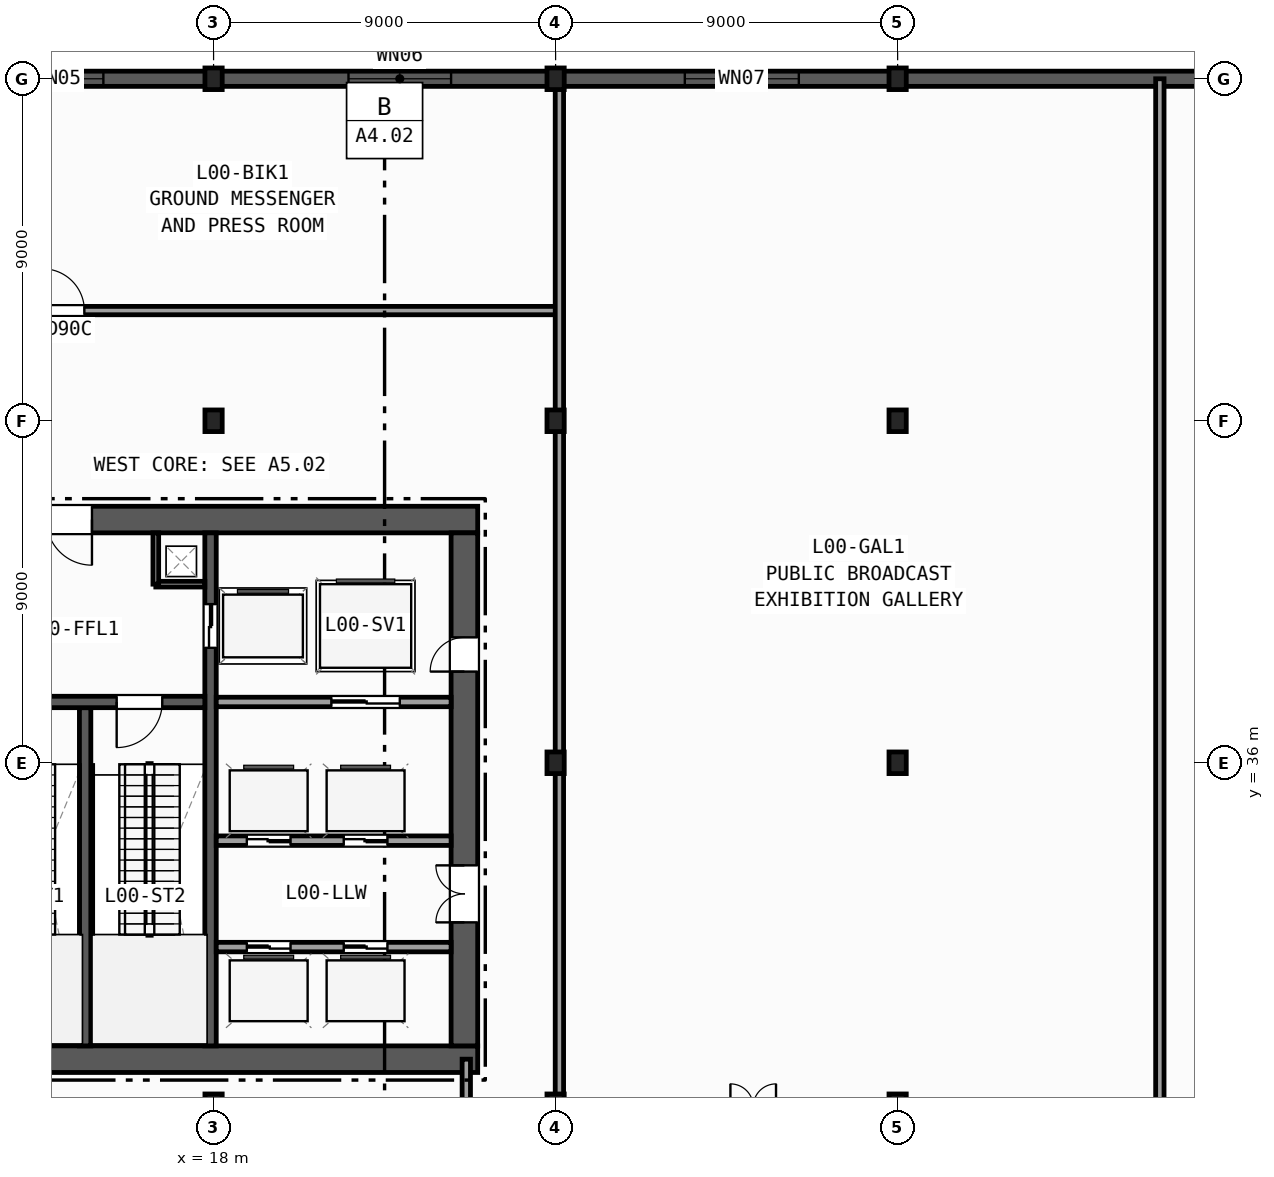
"""IFC4 building model, lengths in metres.
Left out: names, types, materials, properties, quantities, classifications, styles, units other than length and angle.
Written with IfcOpenShell. Run it as: python <this file> out.ifc"""

import sys

from ifc_helpers import new_model, si_unit, direction, frame, frame_2d, origin, origin_2d, place, context, subcontext, project, spatial, rectangle, i_section, extrude, element, fill, save


model = new_model("IFC4")
c1 = context("Model", 3, precision=1e-05, world=origin(), true_north=direction((0.0, 1.0)))
c2 = subcontext(c1, "Body", "Model", "MODEL_VIEW")
j1 = project(units=[si_unit("LENGTHUNIT", "METRE"), si_unit("PLANEANGLEUNIT", "RADIAN")], contexts=[c1])
p1 = place(None, origin())
s1 = spatial("IfcSite", under=j1, at=p1, CompositionType="ELEMENT")
p2 = place(p1, origin())
s2 = spatial("IfcBuilding", under=s1, at=p2, CompositionType="ELEMENT")
p3 = place(p2, origin())
s3 = spatial("IfcBuildingStorey", under=s2, at=p3, CompositionType="ELEMENT", Elevation=0.0)
for number, where, z_axis, x_axis in (
    (1, (18.0, 27.0, 0.0), (0.0, 0.0, 1.0), (1.0, 0.0, 0.0)),
    (2, (18.0, 45.0, 0.0), (0.0, 0.0, 1.0), (1.0, 0.0, 0.0)),
    (3, (18.0, 54.0, 0.0), (0.0, 0.0, 1.0), (1.0, 0.0, 0.0)),
    (4, (27.0, 27.0, 0.0), (0.0, 0.0, 1.0), (1.0, 0.0, 0.0)),
    (5, (27.0, 36.0, 0.0), (0.0, 0.0, 1.0), (1.0, 0.0, 0.0)),
    (6, (27.0, 45.0, 0.0), (0.0, 0.0, 1.0), (1.0, 0.0, 0.0)),
    (7, (27.0, 54.0, 0.0), (0.0, 0.0, 1.0), (1.0, 0.0, 0.0)),
    (8, (36.0, 27.0, 0.0), (0.0, 0.0, 1.0), (1.0, 0.0, 0.0)),
    (9, (36.0, 36.0, 0.0), (0.0, 0.0, 1.0), (1.0, 0.0, 0.0)),
    (10, (36.0, 45.0, 0.0), (0.0, 0.0, 1.0), (1.0, 0.0, 0.0)),
    (11, (36.0, 54.0, 0.0), (0.0, 0.0, 1.0), (1.0, 0.0, 0.0)),
):
    element("IfcColumn", number, at=place(p3, frame(where, z_axis=z_axis, x_axis=x_axis)), inside=s3, PredefinedType="COLUMN", context=c2, shape_type="SweptSolid", body=[
        extrude(i_section(OverallWidth=0.454, OverallDepth=0.569, WebThickness=0.078, FlangeThickness=0.125, FilletRadius=0.015, at=origin_2d()), origin(), (0.0, 0.0, 1.0), 5.8),
    ])
p4 = place(p3, frame((0.2, 54.0, 0.0), z_axis=(0.0, 0.0, 1.0), x_axis=(1.0, 0.0, 0.0)))
e12 = element("IfcWall", 12, at=p4, inside=s3, PredefinedType="SOLIDWALL", context=c2, shape_type="SweptSolid", body=[
    extrude(rectangle(XDim=62.6, YDim=0.4, at=frame_2d((31.3, 0.0))), origin(), (0.0, 0.0, 1.0), 5.48),
])
p5 = place(p4, frame((4.1, 0.0, 1.1)))
e13 = element("IfcOpeningElement", 13, at=p5, cuts=e12, PredefinedType="OPENING", context=c2, shape_type="SweptSolid", body=[
    extrude(rectangle(XDim=1.2, YDim=1.5, at=frame_2d((0.6, 0.75))), frame((0.0, 0.21, 0.0), z_axis=(0.0, -1.0, 0.0), x_axis=(1.0, 0.0, 0.0)), (0.0, 0.0, 1.0), 0.42),
])
p6 = place(p4, frame((12.5, 0.0, 1.1)))
e14 = element("IfcOpeningElement", 14, at=p6, cuts=e12, PredefinedType="OPENING", context=c2, shape_type="SweptSolid", body=[
    extrude(rectangle(XDim=2.4, YDim=1.95, at=frame_2d((1.2, 0.975))), frame((0.0, 0.21, 0.0), z_axis=(0.0, -1.0, 0.0), x_axis=(1.0, 0.0, 0.0)), (0.0, 0.0, 1.0), 0.42),
])
p7 = place(p4, frame((21.35, 0.0, 1.1)))
e15 = element("IfcOpeningElement", 15, at=p7, cuts=e12, PredefinedType="OPENING", context=c2, shape_type="SweptSolid", body=[
    extrude(rectangle(XDim=2.7, YDim=2.1, at=frame_2d((1.35, 1.05))), frame((0.0, 0.21, 0.0), z_axis=(0.0, -1.0, 0.0), x_axis=(1.0, 0.0, 0.0)), (0.0, 0.0, 1.0), 0.42),
])
p8 = place(p4, frame((30.2, 0.0, 1.1)))
e16 = element("IfcOpeningElement", 16, at=p8, cuts=e12, PredefinedType="OPENING", context=c2, shape_type="SweptSolid", body=[
    extrude(rectangle(XDim=3.0, YDim=2.25, at=frame_2d((1.5, 1.125))), frame((0.0, 0.21, 0.0), z_axis=(0.0, -1.0, 0.0), x_axis=(1.0, 0.0, 0.0)), (0.0, 0.0, 1.0), 0.42),
])
p9 = place(p4, frame((48.575, 0.0, 1.1)))
e17 = element("IfcOpeningElement", 17, at=p9, cuts=e12, PredefinedType="OPENING", context=c2, shape_type="SweptSolid", body=[
    extrude(rectangle(XDim=2.25, YDim=2.1, at=frame_2d((1.125, 1.05))), frame((0.0, 0.21, 0.0), z_axis=(0.0, -1.0, 0.0), x_axis=(1.0, 0.0, 0.0)), (0.0, 0.0, 1.0), 0.42),
])
p10 = place(p4, frame((57.425, 0.0, 1.1)))
e18 = element("IfcOpeningElement", 18, at=p10, cuts=e12, PredefinedType="OPENING", context=c2, shape_type="SweptSolid", body=[
    extrude(rectangle(XDim=2.55, YDim=2.25, at=frame_2d((1.275, 1.125))), frame((0.0, 0.21, 0.0), z_axis=(0.0, -1.0, 0.0), x_axis=(1.0, 0.0, 0.0)), (0.0, 0.0, 1.0), 0.42),
])
p11 = place(p3, frame((24.95, 28.2, 0.0), z_axis=(0.0, 0.0, 1.0), x_axis=(-1.0, 0.0, 0.0)))
e19 = element("IfcWall", 19, at=p11, inside=s3, PredefinedType="SHEAR", context=c2, shape_type="SweptSolid", body=[
    extrude(rectangle(XDim=14.1, YDim=0.7, at=frame_2d((7.05, 0.0))), origin(), (0.0, 0.0, 1.0), 5.48),
])
p12 = place(p3, frame((24.95, 42.4, 0.0), z_axis=(0.0, 0.0, 1.0), x_axis=(-1.0, 0.0, 0.0)))
e20 = element("IfcWall", 20, at=p12, inside=s3, PredefinedType="SHEAR", context=c2, shape_type="SweptSolid", body=[
    extrude(rectangle(XDim=14.1, YDim=0.7, at=frame_2d((7.05, 0.0))), origin(), (0.0, 0.0, 1.0), 5.48),
])
p13 = place(p12, frame((10.15, 0.0, 0.0)))
e21 = element("IfcOpeningElement", 21, at=p13, cuts=e20, PredefinedType="OPENING", context=c2, shape_type="SweptSolid", body=[
    extrude(rectangle(XDim=1.2, YDim=2.15, at=frame_2d((0.6, 1.075))), frame((0.0, 0.36, 0.0), z_axis=(0.0, -1.0, 0.0), x_axis=(1.0, 0.0, 0.0)), (0.0, 0.0, 1.0), 0.72),
])
p14 = place(p3, frame((24.6, 28.55, 0.0), z_axis=(0.0, 0.0, 1.0), x_axis=(0.0, 1.0, 0.0)))
e22 = element("IfcWall", 22, at=p14, inside=s3, PredefinedType="SHEAR", context=c2, shape_type="SweptSolid", body=[
    extrude(rectangle(XDim=13.5, YDim=0.7, at=frame_2d((6.75, 0.0))), origin(), (0.0, 0.0, 1.0), 5.48),
])
p15 = place(p14, frame((3.25, 0.0, 0.0)))
e23 = element("IfcOpeningElement", 23, at=p15, cuts=e22, PredefinedType="OPENING", context=c2, shape_type="SweptSolid", body=[
    extrude(rectangle(XDim=1.5, YDim=2.2, at=frame_2d((0.75, 1.1))), frame((0.0, 0.36, 0.0), z_axis=(0.0, -1.0, 0.0), x_axis=(1.0, 0.0, 0.0)), (0.0, 0.0, 1.0), 0.72),
])
p16 = place(p14, frame((9.85, 0.0, 0.0)))
e24 = element("IfcOpeningElement", 24, at=p16, cuts=e22, PredefinedType="OPENING", context=c2, shape_type="SweptSolid", body=[
    extrude(rectangle(XDim=0.9, YDim=2.1, at=frame_2d((0.45, 1.05))), frame((0.0, 0.36, 0.0), z_axis=(0.0, -1.0, 0.0), x_axis=(1.0, 0.0, 0.0)), (0.0, 0.0, 1.0), 0.72),
])
p17 = place(p3, frame((14.62, 28.55, 0.0), z_axis=(0.0, 0.0, 1.0), x_axis=(0.0, 1.0, 0.0)))
e25 = element("IfcWall", 25, at=p17, inside=s3, PredefinedType="SHEAR", context=c2, shape_type="SweptSolid", body=[
    extrude(rectangle(XDim=8.9, YDim=0.3, at=frame_2d((4.45, 0.0))), origin(), (0.0, 0.0, 1.0), 5.48),
])
p18 = place(p3, frame((17.92, 42.05, 0.0), z_axis=(0.0, 0.0, 1.0), x_axis=(0.0, -1.0, 0.0)))
e26 = element("IfcWall", 26, at=p18, inside=s3, PredefinedType="SHEAR", context=c2, shape_type="SweptSolid", body=[
    extrude(rectangle(XDim=13.5, YDim=0.3, at=frame_2d((6.75, 0.0))), origin(), (0.0, 0.0, 1.0), 5.48),
])
p19 = place(p18, frame((1.875, 0.0, 0.0)))
e27 = element("IfcOpeningElement", 27, at=p19, cuts=e26, PredefinedType="OPENING", context=c2, shape_type="SweptSolid", body=[
    extrude(rectangle(XDim=1.15, YDim=2.15, at=frame_2d((0.575, 1.075))), frame((0.0, 0.16, 0.0), z_axis=(0.0, -1.0, 0.0), x_axis=(1.0, 0.0, 0.0)), (0.0, 0.0, 1.0), 0.32),
])
p20 = place(p3, frame((17.77, 37.6, 0.0), z_axis=(0.0, 0.0, 1.0), x_axis=(-1.0, 0.0, 0.0)))
e28 = element("IfcWall", 28, at=p20, inside=s3, PredefinedType="SHEAR", context=c2, shape_type="SweptSolid", body=[
    extrude(rectangle(XDim=6.22, YDim=0.3, at=frame_2d((3.11, 0.0))), origin(), (0.0, 0.0, 1.0), 5.48),
])
p21 = place(p20, frame((4.22, 0.0, 0.0)))
e29 = element("IfcOpeningElement", 29, at=p21, cuts=e28, PredefinedType="OPENING", context=c2, shape_type="SweptSolid", body=[
    extrude(rectangle(XDim=1.2, YDim=2.15, at=frame_2d((0.6, 1.075))), frame((0.0, 0.16, 0.0), z_axis=(0.0, -1.0, 0.0), x_axis=(1.0, 0.0, 0.0)), (0.0, 0.0, 1.0), 0.32),
])
p22 = place(p20, frame((1.12, 0.0, 0.0)))
e30 = element("IfcOpeningElement", 30, at=p22, cuts=e28, PredefinedType="OPENING", context=c2, shape_type="SweptSolid", body=[
    extrude(rectangle(XDim=1.2, YDim=2.15, at=frame_2d((0.6, 1.075))), frame((0.0, 0.16, 0.0), z_axis=(0.0, -1.0, 0.0), x_axis=(1.0, 0.0, 0.0)), (0.0, 0.0, 1.0), 0.32),
])
p23 = place(p3, frame((16.48, 40.7, 0.0), z_axis=(0.0, 0.0, 1.0), x_axis=(1.0, 0.0, 0.0)))
e31 = element("IfcWall", 31, at=p23, inside=s3, PredefinedType="PARTITIONING", context=c2, shape_type="SweptSolid", body=[
    extrude(rectangle(XDim=1.29, YDim=0.15, at=frame_2d((0.645, 0.0))), origin(), (0.0, 0.0, 1.0), 5.48),
])
p24 = place(p3, frame((16.48, 40.7, 0.0), z_axis=(0.0, 0.0, 1.0), x_axis=(0.0, 1.0, 0.0)))
e32 = element("IfcWall", 32, at=p24, inside=s3, PredefinedType="PARTITIONING", context=c2, shape_type="SweptSolid", body=[
    extrude(rectangle(XDim=1.35, YDim=0.15, at=frame_2d((0.675, 0.0))), origin(), (0.0, 0.0, 1.0), 5.48),
])
p25 = place(p3, frame((18.07, 37.6, 0.0), z_axis=(0.0, 0.0, 1.0), x_axis=(1.0, 0.0, 0.0)))
e33 = element("IfcWall", 33, at=p25, inside=s3, PredefinedType="PARTITIONING", context=c2, shape_type="SweptSolid", body=[
    extrude(rectangle(XDim=6.18, YDim=0.25, at=frame_2d((3.09, 0.0))), origin(), (0.0, 0.0, 1.0), 5.48),
])
p26 = place(p25, frame((3.03, 0.0, 0.0)))
e34 = element("IfcOpeningElement", 34, at=p26, cuts=e33, PredefinedType="OPENING", context=c2, shape_type="SweptSolid", body=[
    extrude(rectangle(XDim=1.8, YDim=2.3, at=frame_2d((0.9, 1.15))), frame((0.0, 0.135, 0.0), z_axis=(0.0, -1.0, 0.0), x_axis=(1.0, 0.0, 0.0)), (0.0, 0.0, 1.0), 0.27),
])
p27 = place(p3, frame((18.07, 31.15, 0.0), z_axis=(0.0, 0.0, 1.0), x_axis=(1.0, 0.0, 0.0)))
e35 = element("IfcWall", 35, at=p27, inside=s3, PredefinedType="PARTITIONING", context=c2, shape_type="SweptSolid", body=[
    extrude(rectangle(XDim=6.18, YDim=0.25, at=frame_2d((3.09, 0.0))), origin(), (0.0, 0.0, 1.0), 5.48),
])
p28 = place(p27, frame((0.805, 0.0, 0.0)))
e36 = element("IfcOpeningElement", 36, at=p28, cuts=e35, PredefinedType="OPENING", context=c2, shape_type="SweptSolid", body=[
    extrude(rectangle(XDim=1.15, YDim=2.15, at=frame_2d((0.575, 1.075))), frame((0.0, 0.135, 0.0), z_axis=(0.0, -1.0, 0.0), x_axis=(1.0, 0.0, 0.0)), (0.0, 0.0, 1.0), 0.27),
])
p29 = place(p27, frame((3.355, 0.0, 0.0)))
e37 = element("IfcOpeningElement", 37, at=p29, cuts=e35, PredefinedType="OPENING", context=c2, shape_type="SweptSolid", body=[
    extrude(rectangle(XDim=1.15, YDim=2.15, at=frame_2d((0.575, 1.075))), frame((0.0, 0.135, 0.0), z_axis=(0.0, -1.0, 0.0), x_axis=(1.0, 0.0, 0.0)), (0.0, 0.0, 1.0), 0.27),
])
p30 = place(p3, frame((24.25, 33.95, 0.0), z_axis=(0.0, 0.0, 1.0), x_axis=(-1.0, 0.0, 0.0)))
e38 = element("IfcWall", 38, at=p30, inside=s3, PredefinedType="PARTITIONING", context=c2, shape_type="SweptSolid", body=[
    extrude(rectangle(XDim=6.18, YDim=0.25, at=frame_2d((3.09, 0.0))), origin(), (0.0, 0.0, 1.0), 5.48),
])
p31 = place(p30, frame((4.225, 0.0, 0.0)))
e39 = element("IfcOpeningElement", 39, at=p31, cuts=e38, PredefinedType="OPENING", context=c2, shape_type="SweptSolid", body=[
    extrude(rectangle(XDim=1.15, YDim=2.15, at=frame_2d((0.575, 1.075))), frame((0.0, 0.135, 0.0), z_axis=(0.0, -1.0, 0.0), x_axis=(1.0, 0.0, 0.0)), (0.0, 0.0, 1.0), 0.27),
])
p32 = place(p30, frame((1.675, 0.0, 0.0)))
e40 = element("IfcOpeningElement", 40, at=p32, cuts=e38, PredefinedType="OPENING", context=c2, shape_type="SweptSolid", body=[
    extrude(rectangle(XDim=1.15, YDim=2.15, at=frame_2d((0.575, 1.075))), frame((0.0, 0.135, 0.0), z_axis=(0.0, -1.0, 0.0), x_axis=(1.0, 0.0, 0.0)), (0.0, 0.0, 1.0), 0.27),
])
p33 = place(p3, frame((0.0, 47.9, 0.0), z_axis=(0.0, 0.0, 1.0), x_axis=(1.0, 0.0, 0.0)))
e41 = element("IfcWall", 41, at=p33, inside=s3, PredefinedType="PARTITIONING", context=c2, shape_type="SweptSolid", body=[
    extrude(rectangle(XDim=27.1, YDim=0.22, at=frame_2d((13.55, 0.0))), origin(), (0.0, 0.0, 1.0), 4.605),
])
p34 = place(p33, frame((13.5, 0.0, 0.0)))
e42 = element("IfcOpeningElement", 42, at=p34, cuts=e41, PredefinedType="OPENING", context=c2, shape_type="SweptSolid", body=[
    extrude(rectangle(XDim=1.1, YDim=2.15, at=frame_2d((0.55, 1.075))), frame((0.0, 0.12, 0.0), z_axis=(0.0, -1.0, 0.0), x_axis=(1.0, 0.0, 0.0)), (0.0, 0.0, 1.0), 0.24),
])
p35 = place(p33, frame((3.0, 0.0, 0.0)))
e43 = element("IfcOpeningElement", 43, at=p35, cuts=e41, PredefinedType="OPENING", context=c2, shape_type="SweptSolid", body=[
    extrude(rectangle(XDim=1.0, YDim=2.15, at=frame_2d((0.5, 1.075))), frame((0.0, 0.12, 0.0), z_axis=(0.0, -1.0, 0.0), x_axis=(1.0, 0.0, 0.0)), (0.0, 0.0, 1.0), 0.24),
])
p36 = place(p3, frame((24.65, 9.05, 0.0), z_axis=(0.0, 0.0, 1.0), x_axis=(0.0, 1.0, 0.0)))
e44 = element("IfcWall", 44, at=p36, inside=s3, PredefinedType="PARTITIONING", context=c2, shape_type="SweptSolid", body=[
    extrude(rectangle(XDim=19.15, YDim=0.22, at=frame_2d((9.575, 0.0))), origin(), (0.0, 0.0, 1.0), 4.512),
])
p37 = place(p3, frame((42.9, 24.6, 0.0), z_axis=(0.0, 0.0, 1.0), x_axis=(0.0, 1.0, 0.0)))
e45 = element("IfcWall", 45, at=p37, inside=s3, PredefinedType="PARTITIONING", context=c2, shape_type="SweptSolid", body=[
    extrude(rectangle(XDim=29.4, YDim=0.22, at=frame_2d((14.7, 0.0))), origin(), (0.0, 0.0, 1.0), 4.533),
])
p38 = place(p37, frame((0.7, 0.0, 0.0)))
e46 = element("IfcOpeningElement", 46, at=p38, cuts=e45, PredefinedType="OPENING", context=c2, shape_type="SweptSolid", body=[
    extrude(rectangle(XDim=1.2, YDim=2.15, at=frame_2d((0.6, 1.075))), frame((0.0, 0.12, 0.0), z_axis=(0.0, -1.0, 0.0), x_axis=(1.0, 0.0, 0.0)), (0.0, 0.0, 1.0), 0.24),
])
p39 = place(p3, frame((27.1, 26.95, 0.0), z_axis=(0.0, 0.0, 1.0), x_axis=(0.0, 1.0, 0.0)))
e47 = element("IfcWall", 47, at=p39, inside=s3, PredefinedType="PARTITIONING", context=c2, shape_type="SweptSolid", body=[
    extrude(rectangle(XDim=27.05, YDim=0.22, at=frame_2d((13.525, 0.0))), origin(), (0.0, 0.0, 1.0), 4.533),
])
p40 = place(p6, origin())
e48 = element("IfcWindow", 48, at=p40, inside=s3, PartitioningType="SINGLE_PANEL", PredefinedType="WINDOW", context=c2, shape_type="SweptSolid", body=[
    extrude(rectangle(XDim=2.4, YDim=1.95, at=frame_2d((1.2, 0.975))), frame((0.0, 0.03, 0.0), z_axis=(0.0, -1.0, 0.0), x_axis=(1.0, 0.0, 0.0)), (0.0, 0.0, 1.0), 0.06),
])
fill(e14, e48)
p41 = place(p7, origin())
e49 = element("IfcWindow", 49, at=p41, inside=s3, PartitioningType="SINGLE_PANEL", PredefinedType="WINDOW", context=c2, shape_type="SweptSolid", body=[
    extrude(rectangle(XDim=2.7, YDim=2.1, at=frame_2d((1.35, 1.05))), frame((0.0, 0.03, 0.0), z_axis=(0.0, -1.0, 0.0), x_axis=(1.0, 0.0, 0.0)), (0.0, 0.0, 1.0), 0.06),
])
fill(e15, e49)
p42 = place(p8, origin())
e50 = element("IfcWindow", 50, at=p42, inside=s3, PartitioningType="SINGLE_PANEL", PredefinedType="WINDOW", context=c2, shape_type="SweptSolid", body=[
    extrude(rectangle(XDim=3.0, YDim=2.25, at=frame_2d((1.5, 1.125))), frame((0.0, 0.03, 0.0), z_axis=(0.0, -1.0, 0.0), x_axis=(1.0, 0.0, 0.0)), (0.0, 0.0, 1.0), 0.06),
])
fill(e16, e50)
p43 = place(p22, origin())
e51 = element("IfcDoor", 51, at=p43, inside=s3, OperationType="SINGLE_SWING_RIGHT", PredefinedType="DOOR", context=c2, shape_type="SweptSolid", body=[
    extrude(rectangle(XDim=1.2, YDim=2.15, at=frame_2d((0.6, 1.075))), frame((0.0, 0.025, 0.0), z_axis=(0.0, -1.0, 0.0), x_axis=(1.0, 0.0, 0.0)), (0.0, 0.0, 1.0), 0.05),
])
fill(e30, e51)
p44 = place(p15, origin())
e52 = element("IfcDoor", 52, at=p44, inside=s3, OperationType="DOUBLE_DOOR_SINGLE_SWING", PredefinedType="DOOR", context=c2, shape_type="SweptSolid", body=[
    extrude(rectangle(XDim=1.5, YDim=2.2, at=frame_2d((0.75, 1.1))), frame((0.0, 0.025, 0.0), z_axis=(0.0, -1.0, 0.0), x_axis=(1.0, 0.0, 0.0)), (0.0, 0.0, 1.0), 0.05),
])
fill(e23, e52)
p45 = place(p13, origin())
e53 = element("IfcDoor", 53, at=p45, inside=s3, OperationType="SINGLE_SWING_LEFT", PredefinedType="DOOR", context=c2, shape_type="SweptSolid", body=[
    extrude(rectangle(XDim=1.2, YDim=2.15, at=frame_2d((0.6, 1.075))), frame((0.0, 0.025, 0.0), z_axis=(0.0, -1.0, 0.0), x_axis=(1.0, 0.0, 0.0)), (0.0, 0.0, 1.0), 0.05),
])
fill(e21, e53)
p46 = place(p16, origin())
e54 = element("IfcDoor", 54, at=p46, inside=s3, OperationType="SINGLE_SWING_LEFT", PredefinedType="DOOR", context=c2, shape_type="SweptSolid", body=[
    extrude(rectangle(XDim=0.9, YDim=2.1, at=frame_2d((0.45, 1.05))), frame((0.0, 0.025, 0.0), z_axis=(0.0, -1.0, 0.0), x_axis=(1.0, 0.0, 0.0)), (0.0, 0.0, 1.0), 0.05),
])
fill(e24, e54)
p47 = place(p19, origin())
e55 = element("IfcDoor", 55, at=p47, inside=s3, OperationType="DOUBLE_DOOR_SLIDING", PredefinedType="DOOR", context=c2, shape_type="SweptSolid", body=[
    extrude(rectangle(XDim=1.15, YDim=2.15, at=frame_2d((0.575, 1.075))), frame((0.0, 0.025, 0.0), z_axis=(0.0, -1.0, 0.0), x_axis=(1.0, 0.0, 0.0)), (0.0, 0.0, 1.0), 0.05),
])
fill(e27, e55)
p48 = place(p26, origin())
e56 = element("IfcDoor", 56, at=p48, inside=s3, OperationType="DOUBLE_DOOR_SLIDING", PredefinedType="DOOR", context=c2, shape_type="SweptSolid", body=[
    extrude(rectangle(XDim=1.8, YDim=2.3, at=frame_2d((0.9, 1.15))), frame((0.0, 0.025, 0.0), z_axis=(0.0, -1.0, 0.0), x_axis=(1.0, 0.0, 0.0)), (0.0, 0.0, 1.0), 0.05),
])
fill(e34, e56)
p49 = place(p28, origin())
e57 = element("IfcDoor", 57, at=p49, inside=s3, OperationType="DOUBLE_DOOR_SLIDING", PredefinedType="DOOR", context=c2, shape_type="SweptSolid", body=[
    extrude(rectangle(XDim=1.15, YDim=2.15, at=frame_2d((0.575, 1.075))), frame((0.0, 0.025, 0.0), z_axis=(0.0, -1.0, 0.0), x_axis=(1.0, 0.0, 0.0)), (0.0, 0.0, 1.0), 0.05),
])
fill(e36, e57)
p50 = place(p29, origin())
e58 = element("IfcDoor", 58, at=p50, inside=s3, OperationType="DOUBLE_DOOR_SLIDING", PredefinedType="DOOR", context=c2, shape_type="SweptSolid", body=[
    extrude(rectangle(XDim=1.15, YDim=2.15, at=frame_2d((0.575, 1.075))), frame((0.0, 0.025, 0.0), z_axis=(0.0, -1.0, 0.0), x_axis=(1.0, 0.0, 0.0)), (0.0, 0.0, 1.0), 0.05),
])
fill(e37, e58)
p51 = place(p31, origin())
e59 = element("IfcDoor", 59, at=p51, inside=s3, OperationType="DOUBLE_DOOR_SLIDING", PredefinedType="DOOR", context=c2, shape_type="SweptSolid", body=[
    extrude(rectangle(XDim=1.15, YDim=2.15, at=frame_2d((0.575, 1.075))), frame((0.0, 0.025, 0.0), z_axis=(0.0, -1.0, 0.0), x_axis=(1.0, 0.0, 0.0)), (0.0, 0.0, 1.0), 0.05),
])
fill(e39, e59)
p52 = place(p32, origin())
e60 = element("IfcDoor", 60, at=p52, inside=s3, OperationType="DOUBLE_DOOR_SLIDING", PredefinedType="DOOR", context=c2, shape_type="SweptSolid", body=[
    extrude(rectangle(XDim=1.15, YDim=2.15, at=frame_2d((0.575, 1.075))), frame((0.0, 0.025, 0.0), z_axis=(0.0, -1.0, 0.0), x_axis=(1.0, 0.0, 0.0)), (0.0, 0.0, 1.0), 0.05),
])
fill(e40, e60)
p53 = place(p34, origin())
e61 = element("IfcDoor", 61, at=p53, inside=s3, OperationType="SINGLE_SWING_LEFT", PredefinedType="DOOR", context=c2, shape_type="SweptSolid", body=[
    extrude(rectangle(XDim=1.1, YDim=2.15, at=frame_2d((0.55, 1.075))), frame((0.0, 0.025, 0.0), z_axis=(0.0, -1.0, 0.0), x_axis=(1.0, 0.0, 0.0)), (0.0, 0.0, 1.0), 0.05),
])
fill(e42, e61)
save(model, sys.argv[1])
